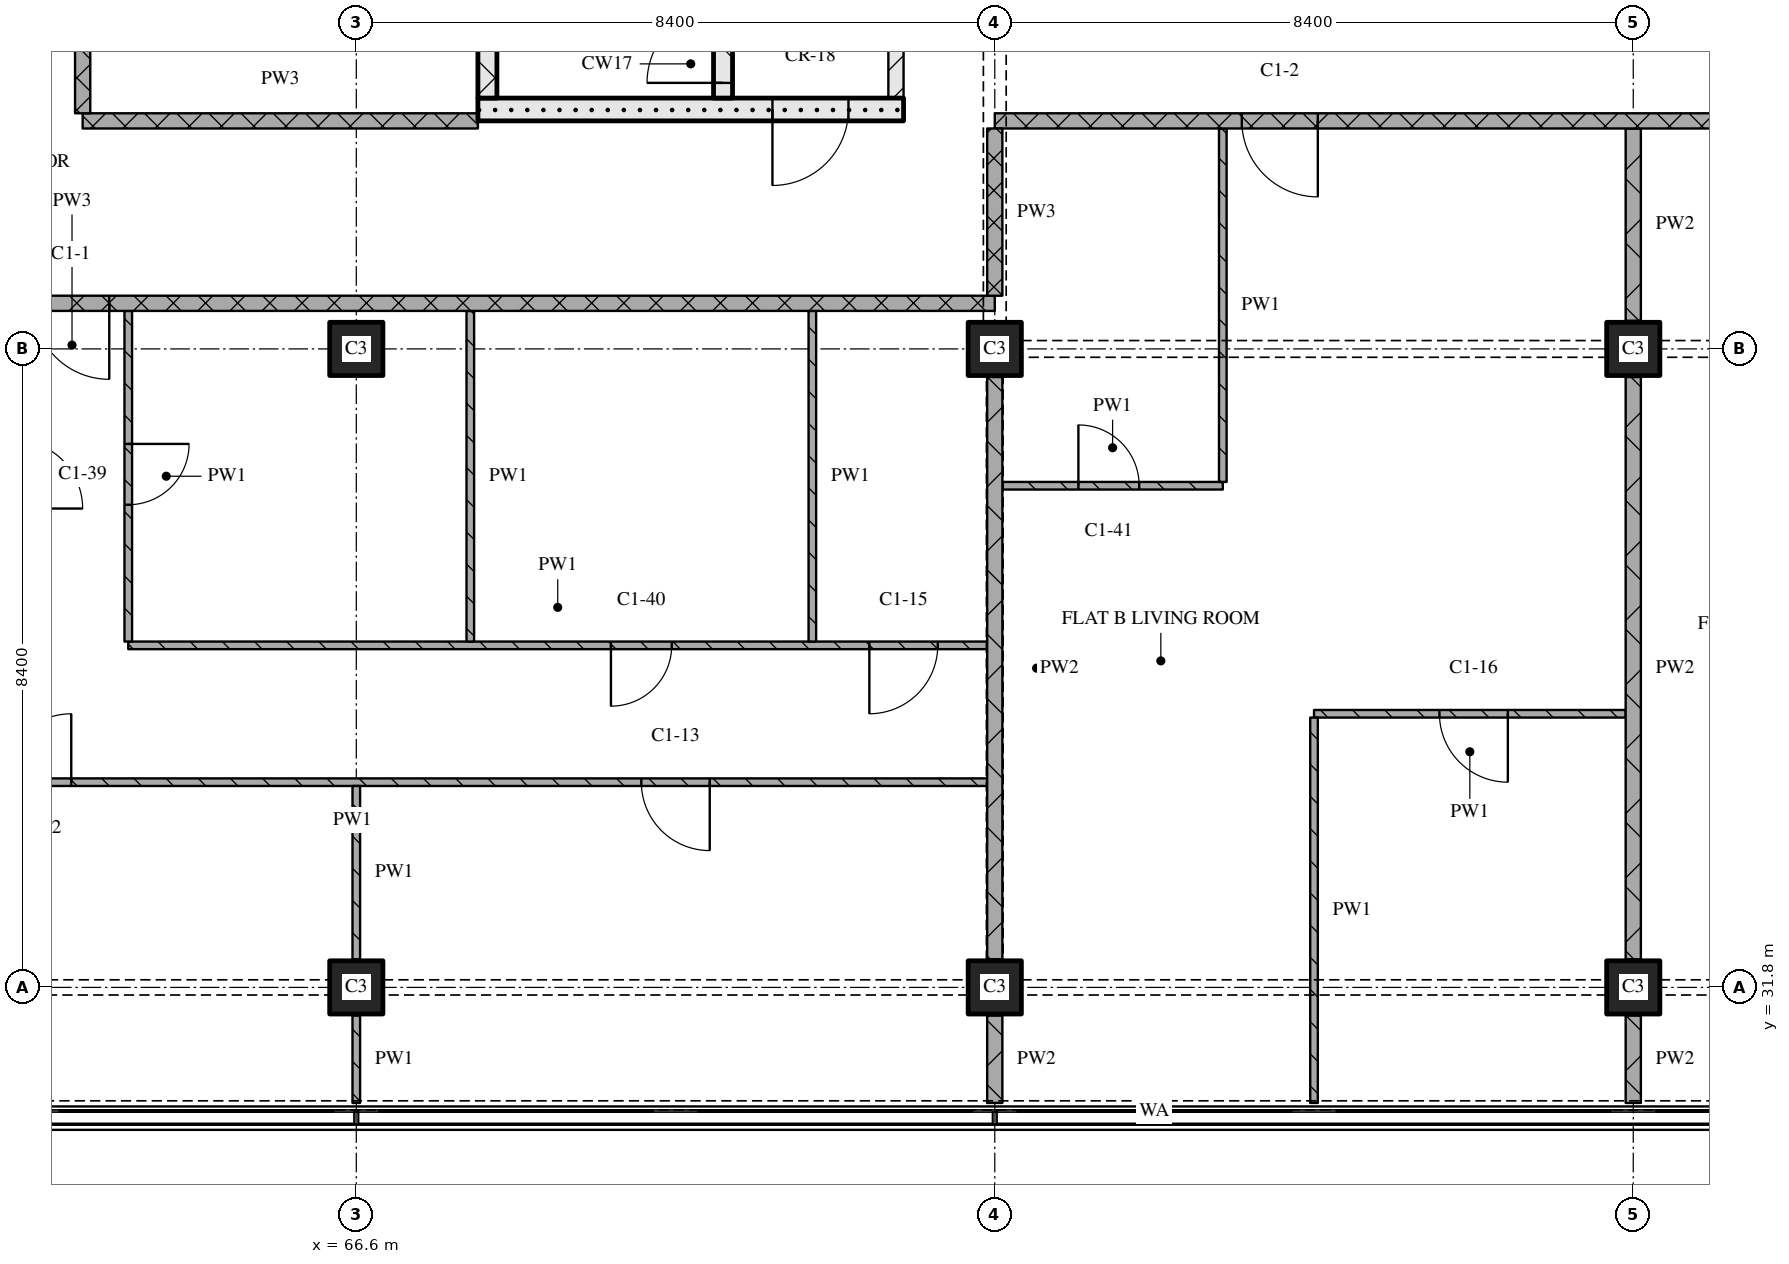
"""IFC4 building model, lengths in metres.
Left out: names, types, materials, properties, quantities, classifications, styles, units other than length and angle.
Written with IfcOpenShell. Run it as: python <this file> out.ifc"""

import sys

from ifc_helpers import new_model, si_unit, direction, frame, frame_2d, origin, origin_2d, place, context, subcontext, project, spatial, rectangle, extrude, element, fill, save


model = new_model("IFC4")
c1 = context("Model", 3, precision=1e-05, world=origin(), true_north=direction((0.0, 1.0)))
c2 = subcontext(c1, "Body", "Model", "MODEL_VIEW")
j1 = project(units=[si_unit("LENGTHUNIT", "METRE"), si_unit("PLANEANGLEUNIT", "RADIAN")], contexts=[c1])
p1 = place(None, origin())
s1 = spatial("IfcSite", under=j1, at=p1, CompositionType="ELEMENT")
p2 = place(p1, origin())
s2 = spatial("IfcBuilding", under=s1, at=p2, CompositionType="ELEMENT")
p3 = place(p2, frame((0.0, 0.0, 151.05)))
s3 = spatial("IfcBuildingStorey", under=s2, at=p3, CompositionType="ELEMENT", Elevation=151.05)
for number, where, z_axis, x_axis in (
    (1, (66.6, 31.8, 0.0), (0.0, 0.0, 1.0), (1.0, 0.0, 0.0)),
    (2, (66.6, 40.2, 0.0), (0.0, 0.0, 1.0), (1.0, 0.0, 0.0)),
    (3, (75.0, 31.8, 0.0), (0.0, 0.0, 1.0), (1.0, 0.0, 0.0)),
    (4, (75.0, 40.2, 0.0), (0.0, 0.0, 1.0), (1.0, 0.0, 0.0)),
    (5, (83.4, 31.8, 0.0), (0.0, 0.0, 1.0), (1.0, 0.0, 0.0)),
    (6, (83.4, 40.2, 0.0), (0.0, 0.0, 1.0), (1.0, 0.0, 0.0)),
):
    element("IfcColumn", number, at=place(p3, frame(where, z_axis=z_axis, x_axis=x_axis)), inside=s3, PredefinedType="COLUMN", context=c2, shape_type="SweptSolid", body=[
        extrude(rectangle(XDim=0.7, YDim=0.7, at=origin_2d()), origin(), (0.0, 0.0, 1.0), 3.6),
    ])
p4 = place(p3, frame((68.2, 43.35, 0.0), z_axis=(0.0, 0.0, 1.0), x_axis=(1.0, 0.0, 0.0)))
e7 = element("IfcWall", 7, at=p4, inside=s3, PredefinedType="SOLIDWALL", context=c2, shape_type="SweptSolid", body=[
    extrude(rectangle(XDim=5.6, YDim=0.3, at=frame_2d((2.8, 0.0))), origin(), (0.0, 0.0, 1.0), 3.32),
])
p5 = place(p4, frame((3.875, 0.0, 0.0)))
e8 = element("IfcOpeningElement", 8, at=p5, cuts=e7, PredefinedType="OPENING", context=c2, shape_type="SweptSolid", body=[
    extrude(rectangle(XDim=1.0, YDim=2.1, at=frame_2d((0.5, 1.05))), frame((0.0, 0.16, 0.0), z_axis=(0.0, -1.0, 0.0), x_axis=(1.0, 0.0, 0.0)), (0.0, 0.0, 1.0), 0.32),
])
p6 = place(p3, frame((68.325, 43.5, 0.0), z_axis=(0.0, 0.0, 1.0), x_axis=(0.0, 1.0, 0.0)))
e9 = element("IfcWall", 9, at=p6, inside=s3, PredefinedType="SOLIDWALL", context=c2, shape_type="SweptSolid", body=[
    extrude(rectangle(XDim=6.9, YDim=0.25, at=frame_2d((3.45, 0.0))), origin(), (0.0, 0.0, 1.0), 3.32),
])
p7 = place(p3, frame((71.425, 43.5, 0.0), z_axis=(0.0, 0.0, 1.0), x_axis=(0.0, 1.0, 0.0)))
e10 = element("IfcWall", 10, at=p7, inside=s3, PredefinedType="SOLIDWALL", context=c2, shape_type="SweptSolid", body=[
    extrude(rectangle(XDim=6.9, YDim=0.25, at=frame_2d((3.45, 0.0))), origin(), (0.0, 0.0, 1.0), 3.32),
])
p8 = place(p7, frame((0.2, 0.0, 0.0)))
e11 = element("IfcOpeningElement", 11, at=p8, cuts=e10, PredefinedType="OPENING", context=c2, shape_type="SweptSolid", body=[
    extrude(rectangle(XDim=1.0, YDim=2.1, at=frame_2d((0.5, 1.05))), frame((0.0, 0.135, 0.0), z_axis=(0.0, -1.0, 0.0), x_axis=(1.0, 0.0, 0.0)), (0.0, 0.0, 1.0), 0.27),
])
p9 = place(p3, frame((73.7, 43.5, 0.0), z_axis=(0.0, 0.0, 1.0), x_axis=(0.0, 1.0, 0.0)))
e12 = element("IfcWall", 12, at=p9, inside=s3, PredefinedType="PARTITIONING", context=c2, shape_type="SweptSolid", body=[
    extrude(rectangle(XDim=6.9, YDim=0.2, at=frame_2d((3.45, 0.0))), origin(), (0.0, 0.0, 1.0), 3.32),
])
p10 = place(p9, frame((1.0, 0.0, 0.0)))
e13 = element("IfcOpeningElement", 13, at=p10, cuts=e12, PredefinedType="OPENING", context=c2, shape_type="SweptSolid", body=[
    extrude(rectangle(XDim=1.0, YDim=2.1, at=frame_2d((0.5, 1.05))), frame((0.0, 0.11, 0.0), z_axis=(0.0, -1.0, 0.0), x_axis=(1.0, 0.0, 0.0)), (0.0, 0.0, 1.0), 0.22),
])
p11 = place(p3, frame((74.9, 34.5, 0.0), z_axis=(0.0, 0.0, 1.0), x_axis=(-1.0, 0.0, 0.0)))
e14 = element("IfcWall", 14, at=p11, inside=s3, PredefinedType="PARTITIONING", context=c2, shape_type="SweptSolid", body=[
    extrude(rectangle(XDim=16.7, YDim=0.1, at=frame_2d((8.35, 0.0))), origin(), (0.0, 0.0, 1.0), 3.32),
])
p12 = place(p11, frame((3.65, 0.0, 0.0)))
e15 = element("IfcOpeningElement", 15, at=p12, cuts=e14, PredefinedType="OPENING", context=c2, shape_type="SweptSolid", body=[
    extrude(rectangle(XDim=0.9, YDim=2.1, at=frame_2d((0.45, 1.05))), frame((0.0, 0.06, 0.0), z_axis=(0.0, -1.0, 0.0), x_axis=(1.0, 0.0, 0.0)), (0.0, 0.0, 1.0), 0.12),
])
p13 = place(p11, frame((12.05, 0.0, 0.0)))
e16 = element("IfcOpeningElement", 16, at=p13, cuts=e14, PredefinedType="OPENING", context=c2, shape_type="SweptSolid", body=[
    extrude(rectangle(XDim=0.9, YDim=2.1, at=frame_2d((0.45, 1.05))), frame((0.0, 0.06, 0.0), z_axis=(0.0, -1.0, 0.0), x_axis=(1.0, 0.0, 0.0)), (0.0, 0.0, 1.0), 0.12),
])
p14 = place(p3, frame((83.3, 35.4, 0.0), z_axis=(0.0, 0.0, 1.0), x_axis=(-1.0, 0.0, 0.0)))
e17 = element("IfcWall", 17, at=p14, inside=s3, PredefinedType="PARTITIONING", context=c2, shape_type="SweptSolid", body=[
    extrude(rectangle(XDim=4.1, YDim=0.1, at=frame_2d((2.05, 0.0))), origin(), (0.0, 0.0, 1.0), 3.32),
])
p15 = place(p14, frame((1.55, 0.0, 0.0)))
e18 = element("IfcOpeningElement", 18, at=p15, cuts=e17, PredefinedType="OPENING", context=c2, shape_type="SweptSolid", body=[
    extrude(rectangle(XDim=0.9, YDim=2.1, at=frame_2d((0.45, 1.05))), frame((0.0, 0.06, 0.0), z_axis=(0.0, -1.0, 0.0), x_axis=(1.0, 0.0, 0.0)), (0.0, 0.0, 1.0), 0.12),
])
p16 = place(p3, frame((63.6, 36.3, 0.0), z_axis=(0.0, 0.0, 1.0), x_axis=(1.0, 0.0, 0.0)))
e19 = element("IfcWall", 19, at=p16, inside=s3, PredefinedType="PARTITIONING", context=c2, shape_type="SweptSolid", body=[
    extrude(rectangle(XDim=11.3, YDim=0.1, at=frame_2d((5.65, 0.0))), origin(), (0.0, 0.0, 1.0), 3.32),
])
p17 = place(p16, frame((6.35, 0.0, 0.0)))
e20 = element("IfcOpeningElement", 20, at=p17, cuts=e19, PredefinedType="OPENING", context=c2, shape_type="SweptSolid", body=[
    extrude(rectangle(XDim=0.8, YDim=2.1, at=frame_2d((0.4, 1.05))), frame((0.0, 0.06, 0.0), z_axis=(0.0, -1.0, 0.0), x_axis=(1.0, 0.0, 0.0)), (0.0, 0.0, 1.0), 0.12),
])
p18 = place(p16, frame((9.75, 0.0, 0.0)))
e21 = element("IfcOpeningElement", 21, at=p18, cuts=e19, PredefinedType="OPENING", context=c2, shape_type="SweptSolid", body=[
    extrude(rectangle(XDim=0.9, YDim=2.1, at=frame_2d((0.45, 1.05))), frame((0.0, 0.06, 0.0), z_axis=(0.0, -1.0, 0.0), x_axis=(1.0, 0.0, 0.0)), (0.0, 0.0, 1.0), 0.12),
])
p19 = place(p3, frame((75.1, 38.4, 0.0), z_axis=(0.0, 0.0, 1.0), x_axis=(1.0, 0.0, 0.0)))
e22 = element("IfcWall", 22, at=p19, inside=s3, PredefinedType="PARTITIONING", context=c2, shape_type="SweptSolid", body=[
    extrude(rectangle(XDim=2.9, YDim=0.1, at=frame_2d((1.45, 0.0))), origin(), (0.0, 0.0, 1.0), 3.32),
])
p20 = place(p19, frame((1.0, 0.0, 0.0)))
e23 = element("IfcOpeningElement", 23, at=p20, cuts=e22, PredefinedType="OPENING", context=c2, shape_type="SweptSolid", body=[
    extrude(rectangle(XDim=0.8, YDim=2.1, at=frame_2d((0.4, 1.05))), frame((0.0, 0.06, 0.0), z_axis=(0.0, -1.0, 0.0), x_axis=(1.0, 0.0, 0.0)), (0.0, 0.0, 1.0), 0.12),
])
p21 = place(p3, frame((75.0, 40.8, 0.0), z_axis=(0.0, 0.0, 1.0), x_axis=(-1.0, 0.0, 0.0)))
e24 = element("IfcWall", 24, at=p21, inside=s3, PredefinedType="PARTITIONING", context=c2, shape_type="SweptSolid", body=[
    extrude(rectangle(XDim=24.28, YDim=0.2, at=frame_2d((12.14, 0.0))), origin(), (0.0, 0.0, 1.0), 3.32),
])
p22 = place(p21, frame((11.65, 0.0, 0.0)))
e25 = element("IfcOpeningElement", 25, at=p22, cuts=e24, PredefinedType="OPENING", context=c2, shape_type="SweptSolid", body=[
    extrude(rectangle(XDim=1.0, YDim=2.1, at=frame_2d((0.5, 1.05))), frame((0.0, 0.11, 0.0), z_axis=(0.0, -1.0, 0.0), x_axis=(1.0, 0.0, 0.0)), (0.0, 0.0, 1.0), 0.22),
])
p23 = place(p3, frame((63.0, 43.2, 0.0), z_axis=(0.0, 0.0, 1.0), x_axis=(1.0, 0.0, 0.0)))
e26 = element("IfcWall", 26, at=p23, inside=s3, PredefinedType="PARTITIONING", context=c2, shape_type="SweptSolid", body=[
    extrude(rectangle(XDim=5.2, YDim=0.2, at=frame_2d((2.6, 0.0))), origin(), (0.0, 0.0, 1.0), 3.32),
])
p24 = place(p3, frame((100.2, 43.2, 0.0), z_axis=(0.0, 0.0, 1.0), x_axis=(-1.0, 0.0, 0.0)))
e27 = element("IfcWall", 27, at=p24, inside=s3, PredefinedType="PARTITIONING", context=c2, shape_type="SweptSolid", body=[
    extrude(rectangle(XDim=25.2, YDim=0.2, at=frame_2d((12.6, 0.0))), origin(), (0.0, 0.0, 1.0), 3.32),
])
p25 = place(p24, frame((7.45, 0.0, 0.0)))
e28 = element("IfcOpeningElement", 28, at=p25, cuts=e27, PredefinedType="OPENING", context=c2, shape_type="SweptSolid", body=[
    extrude(rectangle(XDim=1.0, YDim=2.1, at=frame_2d((0.5, 1.05))), frame((0.0, 0.11, 0.0), z_axis=(0.0, -1.0, 0.0), x_axis=(1.0, 0.0, 0.0)), (0.0, 0.0, 1.0), 0.22),
])
p26 = place(p24, frame((20.95, 0.0, 0.0)))
e29 = element("IfcOpeningElement", 29, at=p26, cuts=e27, PredefinedType="OPENING", context=c2, shape_type="SweptSolid", body=[
    extrude(rectangle(XDim=1.0, YDim=2.1, at=frame_2d((0.5, 1.05))), frame((0.0, 0.11, 0.0), z_axis=(0.0, -1.0, 0.0), x_axis=(1.0, 0.0, 0.0)), (0.0, 0.0, 1.0), 0.22),
])
p27 = place(p3, frame((63.0, 58.7, 0.0), z_axis=(0.0, 0.0, 1.0), x_axis=(0.0, -1.0, 0.0)))
e30 = element("IfcWall", 30, at=p27, inside=s3, PredefinedType="PARTITIONING", context=c2, shape_type="SweptSolid", body=[
    extrude(rectangle(XDim=15.4, YDim=0.2, at=frame_2d((7.7, 0.0))), origin(), (0.0, 0.0, 1.0), 3.32),
])
p28 = place(p27, frame((4.05, 0.0, 0.0)))
e31 = element("IfcOpeningElement", 31, at=p28, cuts=e30, PredefinedType="OPENING", context=c2, shape_type="SweptSolid", body=[
    extrude(rectangle(XDim=1.0, YDim=2.1, at=frame_2d((0.5, 1.05))), frame((0.0, 0.11, 0.0), z_axis=(0.0, -1.0, 0.0), x_axis=(1.0, 0.0, 0.0)), (0.0, 0.0, 1.0), 0.22),
])
p29 = place(p27, frame((11.25, 0.0, 0.0)))
e32 = element("IfcOpeningElement", 32, at=p29, cuts=e30, PredefinedType="OPENING", context=c2, shape_type="SweptSolid", body=[
    extrude(rectangle(XDim=0.9, YDim=2.1, at=frame_2d((0.45, 1.05))), frame((0.0, 0.11, 0.0), z_axis=(0.0, -1.0, 0.0), x_axis=(1.0, 0.0, 0.0)), (0.0, 0.0, 1.0), 0.22),
])
p30 = place(p3, frame((63.6, 40.7, 0.0), z_axis=(0.0, 0.0, 1.0), x_axis=(0.0, -1.0, 0.0)))
e33 = element("IfcWall", 33, at=p30, inside=s3, PredefinedType="PARTITIONING", context=c2, shape_type="SweptSolid", body=[
    extrude(rectangle(XDim=4.35, YDim=0.1, at=frame_2d((2.175, 0.0))), origin(), (0.0, 0.0, 1.0), 3.32),
])
p31 = place(p30, frame((1.75, 0.0, 0.0)))
e34 = element("IfcOpeningElement", 34, at=p31, cuts=e33, PredefinedType="OPENING", context=c2, shape_type="SweptSolid", body=[
    extrude(rectangle(XDim=0.8, YDim=2.1, at=frame_2d((0.4, 1.05))), frame((0.0, 0.06, 0.0), z_axis=(0.0, -1.0, 0.0), x_axis=(1.0, 0.0, 0.0)), (0.0, 0.0, 1.0), 0.12),
])
p32 = place(p3, frame((66.6, 31.43, 0.0), z_axis=(0.0, 0.0, 1.0), x_axis=(0.0, -1.0, 0.0)))
e35 = element("IfcWall", 35, at=p32, inside=s3, PredefinedType="PARTITIONING", context=c2, shape_type="SweptSolid", body=[
    extrude(rectangle(XDim=1.15, YDim=0.1, at=frame_2d((0.575, 0.0))), origin(), (0.0, 0.0, 1.0), 3.32),
])
p33 = place(p3, frame((66.6, 34.45, 0.0), z_axis=(0.0, 0.0, 1.0), x_axis=(0.0, -1.0, 0.0)))
e36 = element("IfcWall", 36, at=p33, inside=s3, PredefinedType="PARTITIONING", context=c2, shape_type="SweptSolid", body=[
    extrude(rectangle(XDim=2.28, YDim=0.1, at=frame_2d((1.14, 0.0))), origin(), (0.0, 0.0, 1.0), 3.32),
])
for number, where, z_axis, x_axis in (
    (37, (68.1, 40.7, 0.0), (0.0, 0.0, 1.0), (0.0, -1.0, 0.0)),
    (38, (72.6, 40.7, 0.0), (0.0, 0.0, 1.0), (0.0, -1.0, 0.0)),
):
    element("IfcWall", number, at=place(p3, frame(where, z_axis=z_axis, x_axis=x_axis)), inside=s3, PredefinedType="PARTITIONING", context=c2, shape_type="SweptSolid", body=[
        extrude(rectangle(XDim=4.35, YDim=0.1, at=frame_2d((2.175, 0.0))), origin(), (0.0, 0.0, 1.0), 3.32),
    ])
p34 = place(p3, frame((75.0, 43.1, 0.0), z_axis=(0.0, 0.0, 1.0), x_axis=(0.0, -1.0, 0.0)))
e39 = element("IfcWall", 39, at=p34, inside=s3, PredefinedType="PARTITIONING", context=c2, shape_type="SweptSolid", body=[
    extrude(rectangle(XDim=2.2, YDim=0.2, at=frame_2d((1.1, 0.0))), origin(), (0.0, 0.0, 1.0), 2.43),
])
p35 = place(p3, frame((75.0, 31.43, 0.0), z_axis=(0.0, 0.0, 1.0), x_axis=(0.0, -1.0, 0.0)))
e40 = element("IfcWall", 40, at=p35, inside=s3, PredefinedType="PARTITIONING", context=c2, shape_type="SweptSolid", body=[
    extrude(rectangle(XDim=1.15, YDim=0.2, at=frame_2d((0.575, 0.0))), origin(), (0.0, 0.0, 1.0), 3.32),
])
p36 = place(p3, frame((75.0, 39.83, 0.0), z_axis=(0.0, 0.0, 1.0), x_axis=(0.0, -1.0, 0.0)))
e41 = element("IfcWall", 41, at=p36, inside=s3, PredefinedType="PARTITIONING", context=c2, shape_type="SweptSolid", body=[
    extrude(rectangle(XDim=7.66, YDim=0.2, at=frame_2d((3.83, 0.0))), origin(), (0.0, 0.0, 1.0), 2.72),
])
p37 = place(p3, frame((78.0, 43.1, 0.0), z_axis=(0.0, 0.0, 1.0), x_axis=(0.0, -1.0, 0.0)))
e42 = element("IfcWall", 42, at=p37, inside=s3, PredefinedType="PARTITIONING", context=c2, shape_type="SweptSolid", body=[
    extrude(rectangle(XDim=4.65, YDim=0.1, at=frame_2d((2.325, 0.0))), origin(), (0.0, 0.0, 1.0), 3.32),
])
p38 = place(p3, frame((79.2, 35.35, 0.0), z_axis=(0.0, 0.0, 1.0), x_axis=(0.0, -1.0, 0.0)))
e43 = element("IfcWall", 43, at=p38, inside=s3, PredefinedType="PARTITIONING", context=c2, shape_type="SweptSolid", body=[
    extrude(rectangle(XDim=5.07, YDim=0.1, at=frame_2d((2.535, 0.0))), origin(), (0.0, 0.0, 1.0), 3.32),
])
p39 = place(p3, frame((83.4, 31.43, 0.0), z_axis=(0.0, 0.0, 1.0), x_axis=(0.0, -1.0, 0.0)))
e44 = element("IfcWall", 44, at=p39, inside=s3, PredefinedType="PARTITIONING", context=c2, shape_type="SweptSolid", body=[
    extrude(rectangle(XDim=1.15, YDim=0.2, at=frame_2d((0.575, 0.0))), origin(), (0.0, 0.0, 1.0), 3.32),
])
p40 = place(p3, frame((83.4, 39.83, 0.0), z_axis=(0.0, 0.0, 1.0), x_axis=(0.0, -1.0, 0.0)))
e45 = element("IfcWall", 45, at=p40, inside=s3, PredefinedType="PARTITIONING", context=c2, shape_type="SweptSolid", body=[
    extrude(rectangle(XDim=7.66, YDim=0.2, at=frame_2d((3.83, 0.0))), origin(), (0.0, 0.0, 1.0), 3.32),
])
p41 = place(p3, frame((83.4, 43.1, 0.0), z_axis=(0.0, 0.0, 1.0), x_axis=(0.0, -1.0, 0.0)))
e46 = element("IfcWall", 46, at=p41, inside=s3, PredefinedType="PARTITIONING", context=c2, shape_type="SweptSolid", body=[
    extrude(rectangle(XDim=2.53, YDim=0.2, at=frame_2d((1.265, 0.0))), origin(), (0.0, 0.0, 1.0), 3.32),
])
p42 = place(p5, origin())
e47 = element("IfcDoor", 47, at=p42, inside=s3, OperationType="SINGLE_SWING_RIGHT", PredefinedType="DOOR", context=c2, shape_type="SweptSolid", body=[
    extrude(rectangle(XDim=1.0, YDim=2.1, at=frame_2d((0.5, 1.05))), frame((0.0, 0.025, 0.0), z_axis=(0.0, -1.0, 0.0), x_axis=(1.0, 0.0, 0.0)), (0.0, 0.0, 1.0), 0.05),
])
fill(e8, e47)
p43 = place(p8, origin())
e48 = element("IfcDoor", 48, at=p43, inside=s3, OperationType="SINGLE_SWING_LEFT", PredefinedType="DOOR", context=c2, shape_type="SweptSolid", body=[
    extrude(rectangle(XDim=1.0, YDim=2.1, at=frame_2d((0.5, 1.05))), frame((0.0, 0.025, 0.0), z_axis=(0.0, -1.0, 0.0), x_axis=(1.0, 0.0, 0.0)), (0.0, 0.0, 1.0), 0.05),
])
fill(e11, e48)
p44 = place(p12, origin())
e49 = element("IfcDoor", 49, at=p44, inside=s3, OperationType="SINGLE_SWING_LEFT", PredefinedType="DOOR", context=c2, shape_type="SweptSolid", body=[
    extrude(rectangle(XDim=0.9, YDim=2.1, at=frame_2d((0.45, 1.05))), frame((0.0, 0.025, 0.0), z_axis=(0.0, -1.0, 0.0), x_axis=(1.0, 0.0, 0.0)), (0.0, 0.0, 1.0), 0.05),
])
fill(e15, e49)
p45 = place(p13, origin())
e50 = element("IfcDoor", 50, at=p45, inside=s3, OperationType="SINGLE_SWING_RIGHT", PredefinedType="DOOR", context=c2, shape_type="SweptSolid", body=[
    extrude(rectangle(XDim=0.9, YDim=2.1, at=frame_2d((0.45, 1.05))), frame((0.0, 0.025, 0.0), z_axis=(0.0, -1.0, 0.0), x_axis=(1.0, 0.0, 0.0)), (0.0, 0.0, 1.0), 0.05),
])
fill(e16, e50)
p46 = place(p15, origin())
e51 = element("IfcDoor", 51, at=p46, inside=s3, OperationType="SINGLE_SWING_LEFT", PredefinedType="DOOR", context=c2, shape_type="SweptSolid", body=[
    extrude(rectangle(XDim=0.9, YDim=2.1, at=frame_2d((0.45, 1.05))), frame((0.0, 0.025, 0.0), z_axis=(0.0, -1.0, 0.0), x_axis=(1.0, 0.0, 0.0)), (0.0, 0.0, 1.0), 0.05),
])
fill(e18, e51)
p47 = place(p17, origin())
e52 = element("IfcDoor", 52, at=p47, inside=s3, OperationType="SINGLE_SWING_RIGHT", PredefinedType="DOOR", context=c2, shape_type="SweptSolid", body=[
    extrude(rectangle(XDim=0.8, YDim=2.1, at=frame_2d((0.4, 1.05))), frame((0.0, 0.025, 0.0), z_axis=(0.0, -1.0, 0.0), x_axis=(1.0, 0.0, 0.0)), (0.0, 0.0, 1.0), 0.05),
])
fill(e20, e52)
p48 = place(p18, origin())
e53 = element("IfcDoor", 53, at=p48, inside=s3, OperationType="SINGLE_SWING_RIGHT", PredefinedType="DOOR", context=c2, shape_type="SweptSolid", body=[
    extrude(rectangle(XDim=0.9, YDim=2.1, at=frame_2d((0.45, 1.05))), frame((0.0, 0.025, 0.0), z_axis=(0.0, -1.0, 0.0), x_axis=(1.0, 0.0, 0.0)), (0.0, 0.0, 1.0), 0.05),
])
fill(e21, e53)
p49 = place(p20, origin())
e54 = element("IfcDoor", 54, at=p49, inside=s3, OperationType="SINGLE_SWING_LEFT", PredefinedType="DOOR", context=c2, shape_type="SweptSolid", body=[
    extrude(rectangle(XDim=0.8, YDim=2.1, at=frame_2d((0.4, 1.05))), frame((0.0, 0.025, 0.0), z_axis=(0.0, -1.0, 0.0), x_axis=(1.0, 0.0, 0.0)), (0.0, 0.0, 1.0), 0.05),
])
fill(e23, e54)
p50 = place(p22, origin())
e55 = element("IfcDoor", 55, at=p50, inside=s3, OperationType="SINGLE_SWING_LEFT", PredefinedType="DOOR", context=c2, shape_type="SweptSolid", body=[
    extrude(rectangle(XDim=1.0, YDim=2.1, at=frame_2d((0.5, 1.05))), frame((0.0, 0.025, 0.0), z_axis=(0.0, -1.0, 0.0), x_axis=(1.0, 0.0, 0.0)), (0.0, 0.0, 1.0), 0.05),
])
fill(e25, e55)
p51 = place(p26, origin())
e56 = element("IfcDoor", 56, at=p51, inside=s3, OperationType="SINGLE_SWING_LEFT", PredefinedType="DOOR", context=c2, shape_type="SweptSolid", body=[
    extrude(rectangle(XDim=1.0, YDim=2.1, at=frame_2d((0.5, 1.05))), frame((0.0, 0.025, 0.0), z_axis=(0.0, -1.0, 0.0), x_axis=(1.0, 0.0, 0.0)), (0.0, 0.0, 1.0), 0.05),
])
fill(e29, e56)
p52 = place(p31, origin())
e57 = element("IfcDoor", 57, at=p52, inside=s3, OperationType="SINGLE_SWING_LEFT", PredefinedType="DOOR", context=c2, shape_type="SweptSolid", body=[
    extrude(rectangle(XDim=0.8, YDim=2.1, at=frame_2d((0.4, 1.05))), frame((0.0, 0.025, 0.0), z_axis=(0.0, -1.0, 0.0), x_axis=(1.0, 0.0, 0.0)), (0.0, 0.0, 1.0), 0.05),
])
fill(e34, e57)
save(model, sys.argv[1])
